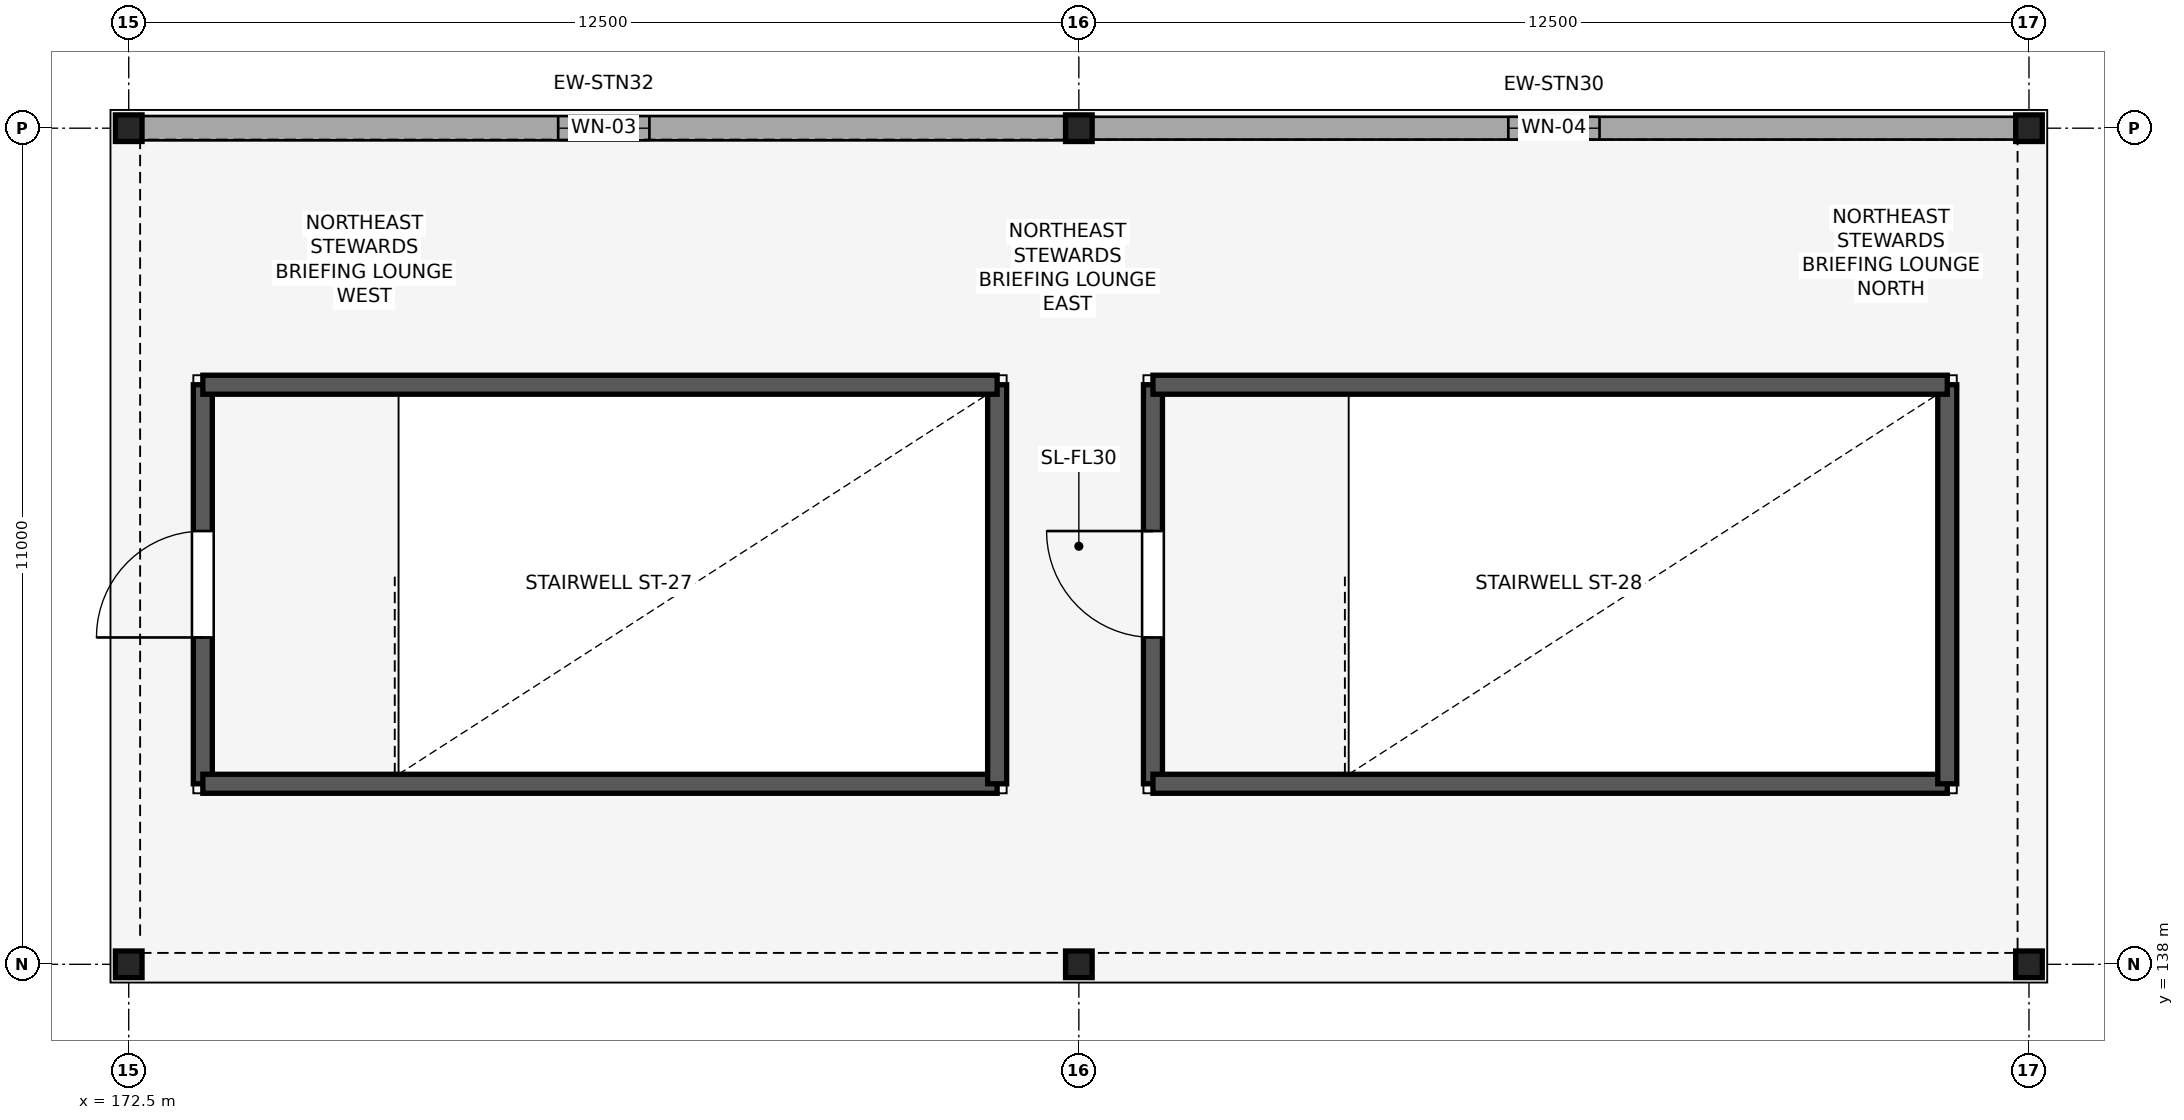
"""IFC4 building model, lengths in metres.
Left out: names, types, materials, properties, quantities, classifications, styles, units other than length and angle.
Written with IfcOpenShell. Run it as: python <this file> out.ifc"""

import sys

from ifc_helpers import new_model, si_unit, direction, frame, frame_2d, origin, origin_2d, place, context, subcontext, project, spatial, rectangle, hollow_rectangle, extrude, element, fill, save


model = new_model("IFC4")
c1 = context("Model", 3, precision=1e-05, world=origin(), true_north=direction((0.0, 1.0)))
c2 = subcontext(c1, "Body", "Model", "MODEL_VIEW")
j1 = project(units=[si_unit("LENGTHUNIT", "METRE"), si_unit("PLANEANGLEUNIT", "RADIAN")], contexts=[c1])
p1 = place(None, origin())
s1 = spatial("IfcSite", under=j1, at=p1, CompositionType="ELEMENT")
p2 = place(p1, origin())
s2 = spatial("IfcBuilding", under=s1, at=p2, CompositionType="ELEMENT")
p3 = place(p2, frame((0.0, 0.0, 5.4)))
s3 = spatial("IfcBuildingStorey", under=s2, at=p3, CompositionType="ELEMENT", Elevation=5.4)
for number, where, z_axis, x_axis in (
    (1, (172.5, 138.0, 0.0), (0.0, 0.0, 1.0), (1.0, 0.0, 0.0)),
    (2, (172.5, 149.0, 0.0), (0.0, 0.0, 1.0), (1.0, 0.0, 0.0)),
    (3, (185.0, 138.0, 0.0), (0.0, 0.0, 1.0), (1.0, 0.0, 0.0)),
    (4, (185.0, 149.0, 0.0), (0.0, 0.0, 1.0), (1.0, 0.0, 0.0)),
    (5, (197.5, 138.0, 0.0), (0.0, 0.0, 1.0), (1.0, 0.0, 0.0)),
    (6, (197.5, 149.0, 0.0), (0.0, 0.0, 1.0), (1.0, 0.0, 0.0)),
):
    element("IfcColumn", number, at=place(p3, frame(where, z_axis=z_axis, x_axis=x_axis)), inside=s3, PredefinedType="COLUMN", context=c2, shape_type="SweptSolid", body=[
        extrude(hollow_rectangle(XDim=0.35, YDim=0.35, WallThickness=0.02, at=origin_2d()), origin(), (0.0, 0.0, 1.0), 5.2),
    ])
p4 = place(p3, frame((172.672, 149.0, 0.0), z_axis=(0.0, 0.0, 1.0), x_axis=(1.0, 0.0, 0.0)))
e7 = element("IfcWall", 7, at=p4, inside=s3, PredefinedType="STANDARD", context=c2, shape_type="SweptSolid", body=[
    extrude(rectangle(XDim=12.156, YDim=0.32, at=frame_2d((6.078, 0.0))), origin(), (0.0, 0.0, 1.0), 4.3),
])
p5 = place(p4, frame((5.478, 0.0, 0.95)))
e8 = element("IfcOpeningElement", 8, at=p5, cuts=e7, PredefinedType="OPENING", context=c2, shape_type="SweptSolid", body=[
    extrude(rectangle(XDim=1.2, YDim=1.85, at=frame_2d((0.6, 0.925))), frame((0.0, 0.17, 0.0), z_axis=(0.0, -1.0, 0.0), x_axis=(1.0, 0.0, 0.0)), (0.0, 0.0, 1.0), 0.34),
])
p6 = place(p3, frame((185.172, 149.0, 0.0), z_axis=(0.0, 0.0, 1.0), x_axis=(1.0, 0.0, 0.0)))
e9 = element("IfcWall", 9, at=p6, inside=s3, PredefinedType="STANDARD", context=c2, shape_type="SweptSolid", body=[
    extrude(rectangle(XDim=12.156, YDim=0.3, at=frame_2d((6.078, 0.0))), origin(), (0.0, 0.0, 1.0), 4.3),
])
p7 = place(p6, frame((5.478, 0.0, 0.95)))
e10 = element("IfcOpeningElement", 10, at=p7, cuts=e9, PredefinedType="OPENING", context=c2, shape_type="SweptSolid", body=[
    extrude(rectangle(XDim=1.2, YDim=2.1, at=frame_2d((0.6, 1.05))), frame((0.0, 0.16, 0.0), z_axis=(0.0, -1.0, 0.0), x_axis=(1.0, 0.0, 0.0)), (0.0, 0.0, 1.0), 0.32),
])
p8 = place(p3, frame((173.475, 145.625, 0.0), z_axis=(0.0, 0.0, 1.0), x_axis=(0.0, -1.0, 0.0)))
e11 = element("IfcWall", 11, at=p8, inside=s3, PredefinedType="SHEAR", context=c2, shape_type="SweptSolid", body=[
    extrude(rectangle(XDim=5.25, YDim=0.25, at=frame_2d((2.625, 0.0))), origin(), (0.0, 0.0, 1.0), 3.2),
])
p9 = place(p8, frame((1.925, 0.0, 0.0)))
e12 = element("IfcOpeningElement", 12, at=p9, cuts=e11, PredefinedType="OPENING", context=c2, shape_type="SweptSolid", body=[
    extrude(rectangle(XDim=1.4, YDim=2.2, at=frame_2d((0.7, 1.1))), frame((0.0, 0.135, 0.0), z_axis=(0.0, -1.0, 0.0), x_axis=(1.0, 0.0, 0.0)), (0.0, 0.0, 1.0), 0.27),
])
p10 = place(p3, frame((173.475, 140.375, 0.0), z_axis=(0.0, 0.0, 1.0), x_axis=(1.0, 0.0, 0.0)))
e13 = element("IfcWall", 13, at=p10, inside=s3, PredefinedType="SHEAR", context=c2, shape_type="SweptSolid", body=[
    extrude(rectangle(XDim=10.45, YDim=0.25, at=frame_2d((5.225, 0.0))), origin(), (0.0, 0.0, 1.0), 3.2),
])
p11 = place(p3, frame((183.925, 140.375, 0.0), z_axis=(0.0, 0.0, 1.0), x_axis=(0.0, 1.0, 0.0)))
e14 = element("IfcWall", 14, at=p11, inside=s3, PredefinedType="SHEAR", context=c2, shape_type="SweptSolid", body=[
    extrude(rectangle(XDim=5.25, YDim=0.25, at=frame_2d((2.625, 0.0))), origin(), (0.0, 0.0, 1.0), 3.2),
])
p12 = place(p3, frame((183.925, 145.625, 0.0), z_axis=(0.0, 0.0, 1.0), x_axis=(-1.0, 0.0, 0.0)))
e15 = element("IfcWall", 15, at=p12, inside=s3, PredefinedType="SHEAR", context=c2, shape_type="SweptSolid", body=[
    extrude(rectangle(XDim=10.45, YDim=0.25, at=frame_2d((5.225, 0.0))), origin(), (0.0, 0.0, 1.0), 3.2),
])
p13 = place(p3, frame((185.975, 145.625, 0.0), z_axis=(0.0, 0.0, 1.0), x_axis=(0.0, -1.0, 0.0)))
e16 = element("IfcWall", 16, at=p13, inside=s3, PredefinedType="SHEAR", context=c2, shape_type="SweptSolid", body=[
    extrude(rectangle(XDim=5.25, YDim=0.25, at=frame_2d((2.625, 0.0))), origin(), (0.0, 0.0, 1.0), 3.2),
])
p14 = place(p13, frame((1.925, 0.0, 0.0)))
e17 = element("IfcOpeningElement", 17, at=p14, cuts=e16, PredefinedType="OPENING", context=c2, shape_type="SweptSolid", body=[
    extrude(rectangle(XDim=1.4, YDim=2.2, at=frame_2d((0.7, 1.1))), frame((0.0, 0.135, 0.0), z_axis=(0.0, -1.0, 0.0), x_axis=(1.0, 0.0, 0.0)), (0.0, 0.0, 1.0), 0.27),
])
p15 = place(p3, frame((185.975, 140.375, 0.0), z_axis=(0.0, 0.0, 1.0), x_axis=(1.0, 0.0, 0.0)))
e18 = element("IfcWall", 18, at=p15, inside=s3, PredefinedType="SHEAR", context=c2, shape_type="SweptSolid", body=[
    extrude(rectangle(XDim=10.45, YDim=0.25, at=frame_2d((5.225, 0.0))), origin(), (0.0, 0.0, 1.0), 3.2),
])
p16 = place(p3, frame((196.425, 140.375, 0.0), z_axis=(0.0, 0.0, 1.0), x_axis=(0.0, 1.0, 0.0)))
e19 = element("IfcWall", 19, at=p16, inside=s3, PredefinedType="SHEAR", context=c2, shape_type="SweptSolid", body=[
    extrude(rectangle(XDim=5.25, YDim=0.25, at=frame_2d((2.625, 0.0))), origin(), (0.0, 0.0, 1.0), 3.2),
])
p17 = place(p3, frame((196.425, 145.625, 0.0), z_axis=(0.0, 0.0, 1.0), x_axis=(-1.0, 0.0, 0.0)))
e20 = element("IfcWall", 20, at=p17, inside=s3, PredefinedType="SHEAR", context=c2, shape_type="SweptSolid", body=[
    extrude(rectangle(XDim=10.45, YDim=0.25, at=frame_2d((5.225, 0.0))), origin(), (0.0, 0.0, 1.0), 3.2),
])
p18 = place(p5, origin())
e21 = element("IfcWindow", 21, at=p18, inside=s3, PartitioningType="SINGLE_PANEL", PredefinedType="WINDOW", context=c2, shape_type="SweptSolid", body=[
    extrude(rectangle(XDim=1.2, YDim=1.85, at=frame_2d((0.6, 0.925))), frame((0.0, 0.03, 0.0), z_axis=(0.0, -1.0, 0.0), x_axis=(1.0, 0.0, 0.0)), (0.0, 0.0, 1.0), 0.06),
])
fill(e8, e21)
p19 = place(p7, origin())
e22 = element("IfcWindow", 22, at=p19, inside=s3, PartitioningType="SINGLE_PANEL", PredefinedType="WINDOW", context=c2, shape_type="SweptSolid", body=[
    extrude(rectangle(XDim=1.2, YDim=2.1, at=frame_2d((0.6, 1.05))), frame((0.0, 0.03, 0.0), z_axis=(0.0, -1.0, 0.0), x_axis=(1.0, 0.0, 0.0)), (0.0, 0.0, 1.0), 0.06),
])
fill(e10, e22)
p20 = place(p9, frame((1.4, 0.0, 0.0), z_axis=(0.0, 0.0, 1.0), x_axis=(-1.0, 0.0, 0.0)))
e23 = element("IfcDoor", 23, at=p20, inside=s3, OperationType="SINGLE_SWING_LEFT", PredefinedType="DOOR", context=c2, shape_type="SweptSolid", body=[
    extrude(rectangle(XDim=1.4, YDim=2.2, at=frame_2d((0.7, 1.1))), frame((0.0, 0.025, 0.0), z_axis=(0.0, -1.0, 0.0), x_axis=(1.0, 0.0, 0.0)), (0.0, 0.0, 1.0), 0.05),
])
fill(e12, e23)
p21 = place(p14, frame((1.4, 0.0, 0.0), z_axis=(0.0, 0.0, 1.0), x_axis=(-1.0, 0.0, 0.0)))
e24 = element("IfcDoor", 24, at=p21, inside=s3, OperationType="SINGLE_SWING_RIGHT", PredefinedType="DOOR", context=c2, shape_type="SweptSolid", body=[
    extrude(rectangle(XDim=1.4, YDim=2.2, at=frame_2d((0.7, 1.1))), frame((0.0, 0.025, 0.0), z_axis=(0.0, -1.0, 0.0), x_axis=(1.0, 0.0, 0.0)), (0.0, 0.0, 1.0), 0.05),
])
fill(e17, e24)
save(model, sys.argv[1])
